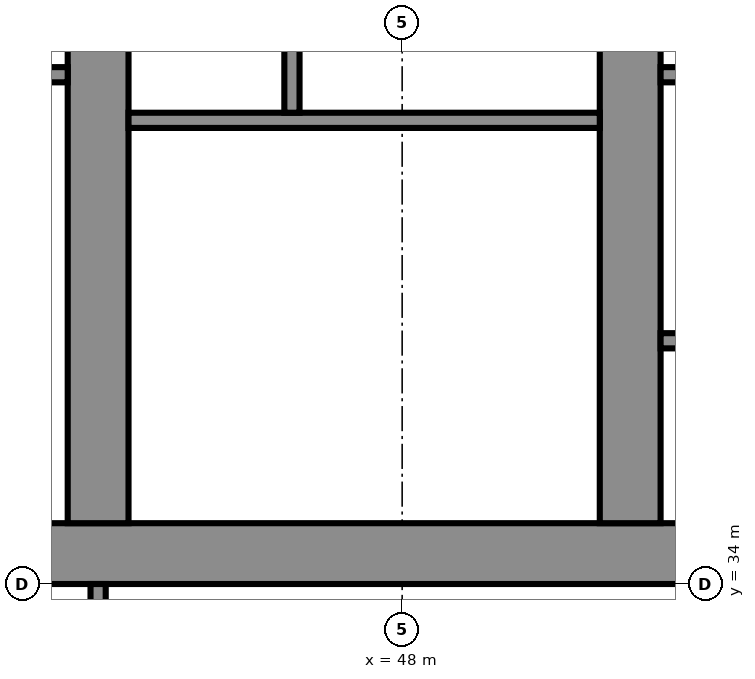
"""IFC4 building model, lengths in metres.
Left out: names, types, materials, properties, quantities, classifications, styles, units other than length and angle.
Written with IfcOpenShell. Run it as: python <this file> out.ifc"""

import sys

from ifc_helpers import new_model, si_unit, direction, frame, frame_2d, origin, place, context, subcontext, project, spatial, polyline, rectangle, outline, extrude, element, fill, save


model = new_model("IFC4")
c1 = context("Model", 3, precision=1e-05, world=origin(), true_north=direction((0.0, 1.0)))
c2 = subcontext(c1, "Body", "Model", "MODEL_VIEW")
j1 = project(units=[si_unit("LENGTHUNIT", "METRE"), si_unit("PLANEANGLEUNIT", "RADIAN")], contexts=[c1])
p1 = place(None, origin())
s1 = spatial("IfcSite", under=j1, at=p1, CompositionType="ELEMENT")
p2 = place(p1, origin())
s2 = spatial("IfcBuilding", under=s1, at=p2, CompositionType="ELEMENT")
p3 = place(p2, frame((0.0, 0.0, 151.9)))
s3 = spatial("IfcBuildingStorey", under=s2, at=p3, CompositionType="ELEMENT", Elevation=151.9)
p4 = place(p3, frame((16.0, 34.4, 0.0), z_axis=(0.0, 0.0, 1.0), x_axis=(1.0, 0.0, 0.0)))
e1 = element("IfcWall", 1, at=p4, inside=s3, PredefinedType="SHEAR", context=c2, shape_type="SweptSolid", body=[
    extrude(rectangle(XDim=42.0, YDim=0.8, at=frame_2d((21.0, 0.0))), origin(), (0.0, 0.0, 1.0), 3.6),
])
p5 = place(p4, frame((3.2, 0.0, 0.0)))
e2 = element("IfcOpeningElement", 2, at=p5, cuts=e1, PredefinedType="OPENING", context=c2, shape_type="SweptSolid", body=[
    extrude(rectangle(XDim=1.0, YDim=2.1, at=frame_2d((0.5, 1.05))), frame((0.0, 0.41, 0.0), z_axis=(0.0, -1.0, 0.0), x_axis=(1.0, 0.0, 0.0)), (0.0, 0.0, 1.0), 0.82),
])
p6 = place(p4, frame((7.65, 0.0, 0.0)))
e3 = element("IfcOpeningElement", 3, at=p6, cuts=e1, PredefinedType="OPENING", context=c2, shape_type="SweptSolid", body=[
    extrude(rectangle(XDim=1.2, YDim=2.1, at=frame_2d((0.6, 1.05))), frame((0.0, 0.41, 0.0), z_axis=(0.0, -1.0, 0.0), x_axis=(1.0, 0.0, 0.0)), (0.0, 0.0, 1.0), 0.82),
])
p7 = place(p4, frame((14.767, 0.0, 0.0)))
e4 = element("IfcOpeningElement", 4, at=p7, cuts=e1, PredefinedType="OPENING", context=c2, shape_type="SweptSolid", body=[
    extrude(rectangle(XDim=1.1, YDim=2.1, at=frame_2d((0.55, 1.05))), frame((0.0, 0.41, 0.0), z_axis=(0.0, -1.0, 0.0), x_axis=(1.0, 0.0, 0.0)), (0.0, 0.0, 1.0), 0.82),
])
p8 = place(p4, frame((19.133, 0.0, 0.0)))
e5 = element("IfcOpeningElement", 5, at=p8, cuts=e1, PredefinedType="OPENING", context=c2, shape_type="SweptSolid", body=[
    extrude(rectangle(XDim=1.1, YDim=2.1, at=frame_2d((0.55, 1.05))), frame((0.0, 0.41, 0.0), z_axis=(0.0, -1.0, 0.0), x_axis=(1.0, 0.0, 0.0)), (0.0, 0.0, 1.0), 0.82),
])
p9 = place(p4, frame((16.8, 0.0, 0.0)))
e6 = element("IfcOpeningElement", 6, at=p9, cuts=e1, PredefinedType="OPENING", context=c2, shape_type="SweptSolid", body=[
    extrude(rectangle(XDim=1.4, YDim=2.1, at=frame_2d((0.7, 1.05))), frame((0.0, 0.41, 0.0), z_axis=(0.0, -1.0, 0.0), x_axis=(1.0, 0.0, 0.0)), (0.0, 0.0, 1.0), 0.82),
])
p10 = place(p4, frame((21.767, 0.0, 0.0)))
e7 = element("IfcOpeningElement", 7, at=p10, cuts=e1, PredefinedType="OPENING", context=c2, shape_type="SweptSolid", body=[
    extrude(rectangle(XDim=1.1, YDim=2.1, at=frame_2d((0.55, 1.05))), frame((0.0, 0.41, 0.0), z_axis=(0.0, -1.0, 0.0), x_axis=(1.0, 0.0, 0.0)), (0.0, 0.0, 1.0), 0.82),
])
p11 = place(p4, frame((23.95, 0.0, 0.0)))
e8 = element("IfcOpeningElement", 8, at=p11, cuts=e1, PredefinedType="OPENING", context=c2, shape_type="SweptSolid", body=[
    extrude(rectangle(XDim=1.1, YDim=2.1, at=frame_2d((0.55, 1.05))), frame((0.0, 0.41, 0.0), z_axis=(0.0, -1.0, 0.0), x_axis=(1.0, 0.0, 0.0)), (0.0, 0.0, 1.0), 0.82),
])
p12 = place(p4, frame((26.133, 0.0, 0.0)))
e9 = element("IfcOpeningElement", 9, at=p12, cuts=e1, PredefinedType="OPENING", context=c2, shape_type="SweptSolid", body=[
    extrude(rectangle(XDim=1.1, YDim=2.1, at=frame_2d((0.55, 1.05))), frame((0.0, 0.41, 0.0), z_axis=(0.0, -1.0, 0.0), x_axis=(1.0, 0.0, 0.0)), (0.0, 0.0, 1.0), 0.82),
])
p13 = place(p4, frame((33.15, 0.0, 0.0)))
e10 = element("IfcOpeningElement", 10, at=p13, cuts=e1, PredefinedType="OPENING", context=c2, shape_type="SweptSolid", body=[
    extrude(rectangle(XDim=1.2, YDim=2.1, at=frame_2d((0.6, 1.05))), frame((0.0, 0.41, 0.0), z_axis=(0.0, -1.0, 0.0), x_axis=(1.0, 0.0, 0.0)), (0.0, 0.0, 1.0), 0.82),
])
p14 = place(p4, frame((35.817, 0.0, 0.0)))
e11 = element("IfcOpeningElement", 11, at=p14, cuts=e1, PredefinedType="OPENING", context=c2, shape_type="SweptSolid", body=[
    extrude(rectangle(XDim=1.0, YDim=2.1, at=frame_2d((0.5, 1.05))), frame((0.0, 0.41, 0.0), z_axis=(0.0, -1.0, 0.0), x_axis=(1.0, 0.0, 0.0)), (0.0, 0.0, 1.0), 0.82),
])
p15 = place(p4, frame((39.95, 0.0, 0.0)))
e12 = element("IfcOpeningElement", 12, at=p15, cuts=e1, PredefinedType="OPENING", context=c2, shape_type="SweptSolid", body=[
    extrude(rectangle(XDim=1.0, YDim=2.1, at=frame_2d((0.5, 1.05))), frame((0.0, 0.41, 0.0), z_axis=(0.0, -1.0, 0.0), x_axis=(1.0, 0.0, 0.0)), (0.0, 0.0, 1.0), 0.82),
])
p16 = place(p4, frame((37.767, 0.0, 0.0)))
e13 = element("IfcOpeningElement", 13, at=p16, cuts=e1, PredefinedType="OPENING", context=c2, shape_type="SweptSolid", body=[
    extrude(rectangle(XDim=1.4, YDim=2.1, at=frame_2d((0.7, 1.05))), frame((0.0, 0.41, 0.0), z_axis=(0.0, -1.0, 0.0), x_axis=(1.0, 0.0, 0.0)), (0.0, 0.0, 1.0), 0.82),
])
p17 = place(p3, frame((44.0, 34.8, 0.0), z_axis=(0.0, 0.0, 1.0), x_axis=(0.0, 1.0, 0.0)))
e14 = element("IfcWall", 14, at=p17, inside=s3, PredefinedType="SHEAR", context=c2, shape_type="SweptSolid", body=[
    extrude(rectangle(XDim=14.374, YDim=0.8, at=frame_2d((7.187, 0.0))), origin(), (0.0, 0.0, 1.0), 3.6),
])
p18 = place(p17, frame((11.312, 0.0, 0.0)))
e15 = element("IfcOpeningElement", 15, at=p18, cuts=e14, PredefinedType="OPENING", context=c2, shape_type="SweptSolid", body=[
    extrude(rectangle(XDim=1.0, YDim=2.1, at=frame_2d((0.5, 1.05))), frame((0.0, 0.41, 0.0), z_axis=(0.0, -1.0, 0.0), x_axis=(1.0, 0.0, 0.0)), (0.0, 0.0, 1.0), 0.82),
])
p19 = place(p17, frame((3.6, 0.0, 0.0)))
e16 = element("IfcOpeningElement", 16, at=p19, cuts=e14, PredefinedType="OPENING", context=c2, shape_type="SweptSolid", body=[
    extrude(rectangle(XDim=1.1, YDim=2.1, at=frame_2d((0.55, 1.05))), frame((0.0, 0.41, 0.0), z_axis=(0.0, -1.0, 0.0), x_axis=(1.0, 0.0, 0.0)), (0.0, 0.0, 1.0), 0.82),
])
p20 = place(p3, frame((51.0, 34.8, 0.0), z_axis=(0.0, 0.0, 1.0), x_axis=(0.0, 1.0, 0.0)))
e17 = element("IfcWall", 17, at=p20, inside=s3, PredefinedType="SHEAR", context=c2, shape_type="SweptSolid", body=[
    extrude(rectangle(XDim=13.762, YDim=0.8, at=frame_2d((6.881, 0.0))), origin(), (0.0, 0.0, 1.0), 3.6),
])
p21 = place(p20, frame((3.6, 0.0, 0.0)))
e18 = element("IfcOpeningElement", 18, at=p21, cuts=e17, PredefinedType="OPENING", context=c2, shape_type="SweptSolid", body=[
    extrude(rectangle(XDim=1.1, YDim=2.1, at=frame_2d((0.55, 1.05))), frame((0.0, 0.41, 0.0), z_axis=(0.0, -1.0, 0.0), x_axis=(1.0, 0.0, 0.0)), (0.0, 0.0, 1.0), 0.82),
])
p22 = place(p3, frame((37.4, 40.7, 0.0), z_axis=(0.0, 0.0, 1.0), x_axis=(1.0, 0.0, 0.0)))
e19 = element("IfcWall", 19, at=p22, inside=s3, PredefinedType="PARTITIONING", context=c2, shape_type="SweptSolid", body=[
    extrude(rectangle(XDim=6.2, YDim=0.2, at=frame_2d((3.1, 0.0))), origin(), (0.0, 0.0, 1.0), 3.2),
])
p23 = place(p22, frame((0.367, 0.0, 0.0)))
e20 = element("IfcOpeningElement", 20, at=p23, cuts=e19, PredefinedType="OPENING", context=c2, shape_type="SweptSolid", body=[
    extrude(rectangle(XDim=1.1, YDim=2.1, at=frame_2d((0.55, 1.05))), frame((0.0, 0.11, 0.0), z_axis=(0.0, -1.0, 0.0), x_axis=(1.0, 0.0, 0.0)), (0.0, 0.0, 1.0), 0.22),
])
p24 = place(p22, frame((2.55, 0.0, 0.0)))
e21 = element("IfcOpeningElement", 21, at=p24, cuts=e19, PredefinedType="OPENING", context=c2, shape_type="SweptSolid", body=[
    extrude(rectangle(XDim=1.1, YDim=2.1, at=frame_2d((0.55, 1.05))), frame((0.0, 0.11, 0.0), z_axis=(0.0, -1.0, 0.0), x_axis=(1.0, 0.0, 0.0)), (0.0, 0.0, 1.0), 0.22),
])
p25 = place(p22, frame((4.733, 0.0, 0.0)))
e22 = element("IfcOpeningElement", 22, at=p25, cuts=e19, PredefinedType="OPENING", context=c2, shape_type="SweptSolid", body=[
    extrude(rectangle(XDim=1.1, YDim=2.1, at=frame_2d((0.55, 1.05))), frame((0.0, 0.11, 0.0), z_axis=(0.0, -1.0, 0.0), x_axis=(1.0, 0.0, 0.0)), (0.0, 0.0, 1.0), 0.22),
])
p26 = place(p3, origin())
e23 = element("IfcWall", 23, at=p26, inside=s3, PredefinedType="PARTITIONING", context=c2, shape_type="SweptSolid", body=[
    extrude(outline(polyline([(41.567, 37.1), (39.433, 37.1), (39.433, 34.8), (39.233, 34.8), (39.233, 37.65), (37.4, 37.65), (37.4, 37.85), (39.233, 37.85), (39.433, 37.85), (39.433, 37.3), (41.567, 37.3), (41.567, 37.55), (41.767, 37.55), (43.6, 37.55), (43.6, 37.35), (41.767, 37.35), (41.767, 34.8), (41.567, 34.8), (41.567, 37.1)])), origin(), (0.0, 0.0, 1.0), 3.2),
])
p27 = place(p3, origin())
e24 = element("IfcWall", 24, at=p27, inside=s3, PredefinedType="PARTITIONING", context=c2, shape_type="SweptSolid", body=[
    extrude(outline(polyline([(39.433, 40.8), (39.233, 40.8), (39.233, 43.8), (37.4, 43.8), (37.4, 44.0), (43.6, 44.0), (43.6, 43.8), (41.767, 43.8), (41.767, 40.8), (41.567, 40.8), (41.567, 43.8), (39.433, 43.8), (39.433, 40.8)])), origin(), (0.0, 0.0, 1.0), 3.2),
])
p28 = place(p3, frame((44.4, 40.1, 0.0), z_axis=(0.0, 0.0, 1.0), x_axis=(1.0, 0.0, 0.0)))
e25 = element("IfcWall", 25, at=p28, inside=s3, PredefinedType="SHEAR", context=c2, shape_type="SweptSolid", body=[
    extrude(rectangle(XDim=6.2, YDim=0.2, at=frame_2d((3.1, 0.0))), origin(), (0.0, 0.0, 1.0), 3.2),
])
p29 = place(p28, frame((3.525, 0.0, 0.0)))
e26 = element("IfcOpeningElement", 26, at=p29, cuts=e25, PredefinedType="OPENING", context=c2, shape_type="SweptSolid", body=[
    extrude(rectangle(XDim=1.2, YDim=2.1, at=frame_2d((0.6, 1.05))), frame((0.0, 0.11, 0.0), z_axis=(0.0, -1.0, 0.0), x_axis=(1.0, 0.0, 0.0)), (0.0, 0.0, 1.0), 0.22),
])
p30 = place(p28, frame((0.575, 0.0, 0.0)))
e27 = element("IfcOpeningElement", 27, at=p30, cuts=e25, PredefinedType="OPENING", context=c2, shape_type="SweptSolid", body=[
    extrude(rectangle(XDim=0.9, YDim=2.1, at=frame_2d((0.45, 1.05))), frame((0.0, 0.11, 0.0), z_axis=(0.0, -1.0, 0.0), x_axis=(1.0, 0.0, 0.0)), (0.0, 0.0, 1.0), 0.22),
])
p31 = place(p3, frame((46.55, 40.2, 0.0), z_axis=(0.0, 0.0, 1.0), x_axis=(0.0, 1.0, 0.0)))
e28 = element("IfcWall", 28, at=p31, inside=s3, PredefinedType="SHEAR", context=c2, shape_type="SweptSolid", body=[
    extrude(rectangle(XDim=7.2, YDim=0.2, at=frame_2d((3.6, 0.0))), origin(), (0.0, 0.0, 1.0), 3.2),
])
p32 = place(p3, frame((51.4, 37.2, 0.0), z_axis=(0.0, 0.0, 1.0), x_axis=(1.0, 0.0, 0.0)))
e29 = element("IfcWall", 29, at=p32, inside=s3, PredefinedType="PARTITIONING", context=c2, shape_type="SweptSolid", body=[
    extrude(rectangle(XDim=1.833, YDim=0.2, at=frame_2d((0.917, 0.0))), origin(), (0.0, 0.0, 1.0), 3.2),
])
p33 = place(p32, frame((0.417, 0.0, 0.0)))
e30 = element("IfcOpeningElement", 30, at=p33, cuts=e29, PredefinedType="OPENING", context=c2, shape_type="SweptSolid", body=[
    extrude(rectangle(XDim=1.0, YDim=2.1, at=frame_2d((0.5, 1.05))), frame((0.0, 0.11, 0.0), z_axis=(0.0, -1.0, 0.0), x_axis=(1.0, 0.0, 0.0)), (0.0, 0.0, 1.0), 0.22),
])
p34 = place(p3, frame((51.4, 40.7, 0.0), z_axis=(0.0, 0.0, 1.0), x_axis=(1.0, 0.0, 0.0)))
e31 = element("IfcWall", 31, at=p34, inside=s3, PredefinedType="PARTITIONING", context=c2, shape_type="SweptSolid", body=[
    extrude(rectangle(XDim=5.8, YDim=0.2, at=frame_2d((2.9, 0.0))), origin(), (0.0, 0.0, 1.0), 3.2),
])
p35 = place(p34, frame((0.367, 0.0, 0.0)))
e32 = element("IfcOpeningElement", 32, at=p35, cuts=e31, PredefinedType="OPENING", context=c2, shape_type="SweptSolid", body=[
    extrude(rectangle(XDim=1.1, YDim=2.1, at=frame_2d((0.55, 1.05))), frame((0.0, 0.11, 0.0), z_axis=(0.0, -1.0, 0.0), x_axis=(1.0, 0.0, 0.0)), (0.0, 0.0, 1.0), 0.22),
])
p36 = place(p34, frame((3.417, 0.0, 0.0)))
e33 = element("IfcOpeningElement", 33, at=p36, cuts=e31, PredefinedType="OPENING", context=c2, shape_type="SweptSolid", body=[
    extrude(rectangle(XDim=1.0, YDim=2.1, at=frame_2d((0.5, 1.05))), frame((0.0, 0.11, 0.0), z_axis=(0.0, -1.0, 0.0), x_axis=(1.0, 0.0, 0.0)), (0.0, 0.0, 1.0), 0.22),
])
p37 = place(p3, frame((44.0, 30.5, 0.0), z_axis=(0.0, 0.0, 1.0), x_axis=(0.0, 1.0, 0.0)))
e34 = element("IfcWall", 34, at=p37, inside=s3, PredefinedType="PARTITIONING", context=c2, shape_type="SweptSolid", body=[
    extrude(rectangle(XDim=3.5, YDim=0.2, at=frame_2d((1.75, 0.0))), origin(), (0.0, 0.0, 1.0), 3.2),
])
p38 = place(p37, frame((1.2, 0.0, 0.0)))
e35 = element("IfcOpeningElement", 35, at=p38, cuts=e34, PredefinedType="OPENING", context=c2, shape_type="SweptSolid", body=[
    extrude(rectangle(XDim=1.1, YDim=2.1, at=frame_2d((0.55, 1.05))), frame((0.0, 0.11, 0.0), z_axis=(0.0, -1.0, 0.0), x_axis=(1.0, 0.0, 0.0)), (0.0, 0.0, 1.0), 0.22),
])
p39 = place(p29, origin())
e36 = element("IfcDoor", 36, at=p39, inside=s3, OperationType="SINGLE_SWING_RIGHT", PredefinedType="DOOR", context=c2, shape_type="SweptSolid", body=[
    extrude(rectangle(XDim=1.2, YDim=2.1, at=frame_2d((0.6, 1.05))), frame((0.0, 0.025, 0.0), z_axis=(0.0, -1.0, 0.0), x_axis=(1.0, 0.0, 0.0)), (0.0, 0.0, 1.0), 0.05),
])
fill(e26, e36)
p40 = place(p30, origin())
e37 = element("IfcDoor", 37, at=p40, inside=s3, OperationType="SINGLE_SWING_LEFT", PredefinedType="DOOR", context=c2, shape_type="SweptSolid", body=[
    extrude(rectangle(XDim=0.9, YDim=2.1, at=frame_2d((0.45, 1.05))), frame((0.0, 0.025, 0.0), z_axis=(0.0, -1.0, 0.0), x_axis=(1.0, 0.0, 0.0)), (0.0, 0.0, 1.0), 0.05),
])
fill(e27, e37)
p41 = place(p13, origin())
e38 = element("IfcDoor", 38, at=p41, inside=s3, OperationType="SINGLE_SWING_LEFT", PredefinedType="DOOR", context=c2, shape_type="SweptSolid", body=[
    extrude(rectangle(XDim=1.2, YDim=2.1, at=frame_2d((0.6, 1.05))), frame((0.0, 0.025, 0.0), z_axis=(0.0, -1.0, 0.0), x_axis=(1.0, 0.0, 0.0)), (0.0, 0.0, 1.0), 0.05),
])
fill(e10, e38)
p42 = place(p19, origin())
e39 = element("IfcDoor", 39, at=p42, inside=s3, OperationType="SINGLE_SWING_LEFT", PredefinedType="DOOR", context=c2, shape_type="SweptSolid", body=[
    extrude(rectangle(XDim=1.1, YDim=2.1, at=frame_2d((0.55, 1.05))), frame((0.0, 0.025, 0.0), z_axis=(0.0, -1.0, 0.0), x_axis=(1.0, 0.0, 0.0)), (0.0, 0.0, 1.0), 0.05),
])
fill(e16, e39)
p43 = place(p21, origin())
e40 = element("IfcDoor", 40, at=p43, inside=s3, OperationType="SINGLE_SWING_RIGHT", PredefinedType="DOOR", context=c2, shape_type="SweptSolid", body=[
    extrude(rectangle(XDim=1.1, YDim=2.1, at=frame_2d((0.55, 1.05))), frame((0.0, 0.025, 0.0), z_axis=(0.0, -1.0, 0.0), x_axis=(1.0, 0.0, 0.0)), (0.0, 0.0, 1.0), 0.05),
])
fill(e18, e40)
save(model, sys.argv[1])
